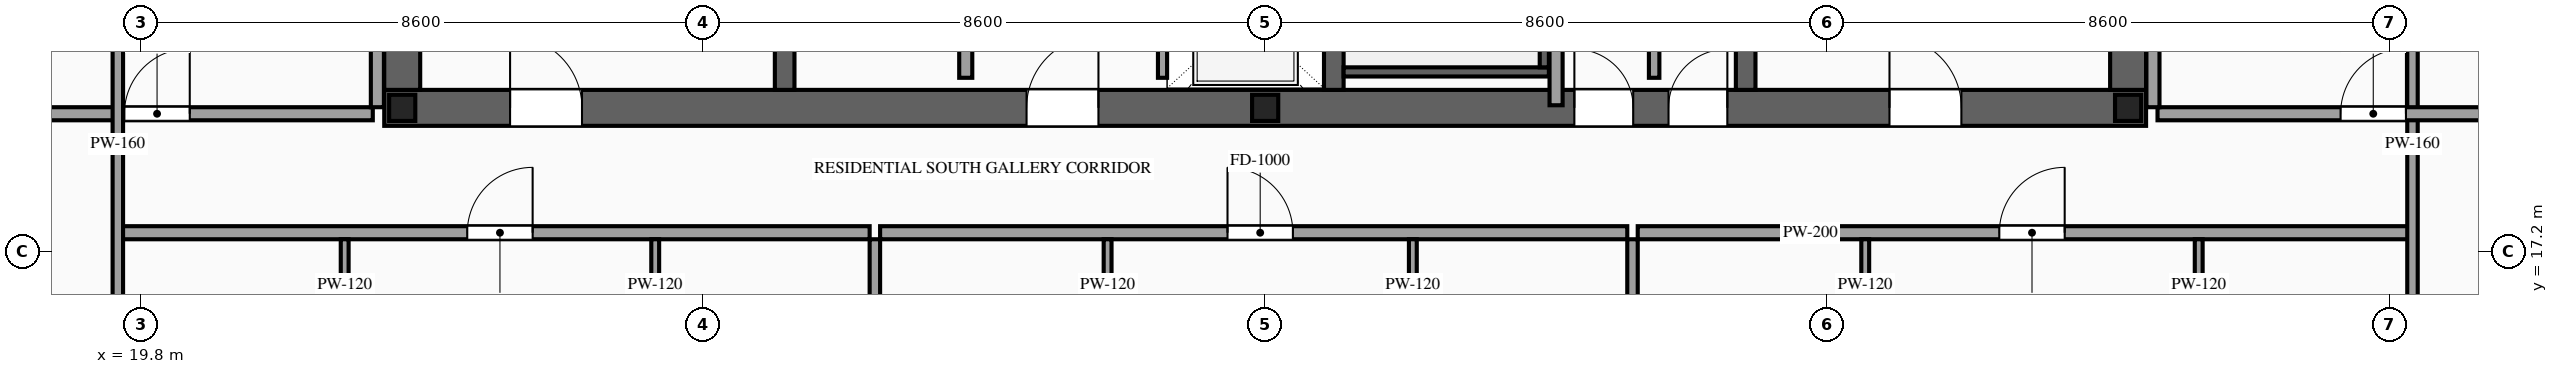
"""IFC4 building model, lengths in metres.
Left out: names, types, materials, properties, quantities, classifications, styles, units other than length and angle.
Written with IfcOpenShell. Run it as: python <this file> out.ifc"""

import sys

from ifc_helpers import new_model, si_unit, direction, frame, frame_2d, origin, origin_2d, place, context, subcontext, project, spatial, rectangle, i_section, extrude, source, transform, mapped, element, fill, save


model = new_model("IFC4")
c1 = context("Model", 3, precision=1e-05, world=origin(), true_north=direction((0.0, 1.0)))
c2 = subcontext(c1, "Body", "Model", "MODEL_VIEW")
j1 = project(units=[si_unit("LENGTHUNIT", "METRE"), si_unit("PLANEANGLEUNIT", "RADIAN")], contexts=[c1])
p1 = place(None, origin())
s1 = spatial("IfcSite", under=j1, at=p1, CompositionType="ELEMENT")
p2 = place(p1, origin())
s2 = spatial("IfcBuilding", under=s1, at=p2, CompositionType="ELEMENT")
p3 = place(p2, frame((0.0, 0.0, 238.1)))
s3 = spatial("IfcBuildingStorey", under=s2, at=p3, CompositionType="ELEMENT", Elevation=238.1)
p4 = place(p3, frame((23.525, 19.4, 0.0), z_axis=(0.0, 0.0, 1.0), x_axis=(1.0, 0.0, 0.0)))
e1 = element("IfcWall", 1, at=p4, inside=s3, PredefinedType="SHEAR", context=c2, shape_type="SweptSolid", body=[
    extrude(rectangle(XDim=26.95, YDim=0.55, at=frame_2d((13.475, 0.0))), origin(), (0.0, 0.0, 1.0), 3.5),
])
p5 = place(p4, frame((1.925, 0.0, 0.0)))
e2 = element("IfcOpeningElement", 2, at=p5, cuts=e1, PredefinedType="OPENING", context=c2, shape_type="SweptSolid", body=[
    extrude(rectangle(XDim=1.1, YDim=2.2, at=frame_2d((0.55, 1.1))), frame((0.0, 0.29, 0.0), z_axis=(0.0, -1.0, 0.0), x_axis=(1.0, 0.0, 0.0)), (0.0, 0.0, 1.0), 0.58),
])
p6 = place(p4, frame((9.825, 0.0, 0.0)))
e3 = element("IfcOpeningElement", 3, at=p6, cuts=e1, PredefinedType="OPENING", context=c2, shape_type="SweptSolid", body=[
    extrude(rectangle(XDim=1.1, YDim=2.2, at=frame_2d((0.55, 1.1))), frame((0.0, 0.29, 0.0), z_axis=(0.0, -1.0, 0.0), x_axis=(1.0, 0.0, 0.0)), (0.0, 0.0, 1.0), 0.58),
])
p7 = place(p4, frame((23.025, 0.0, 0.0)))
e4 = element("IfcOpeningElement", 4, at=p7, cuts=e1, PredefinedType="OPENING", context=c2, shape_type="SweptSolid", body=[
    extrude(rectangle(XDim=1.1, YDim=2.2, at=frame_2d((0.55, 1.1))), frame((0.0, 0.29, 0.0), z_axis=(0.0, -1.0, 0.0), x_axis=(1.0, 0.0, 0.0)), (0.0, 0.0, 1.0), 0.58),
])
p8 = place(p4, frame((19.645, 0.0, 0.0)))
e5 = element("IfcOpeningElement", 5, at=p8, cuts=e1, PredefinedType="OPENING", context=c2, shape_type="SweptSolid", body=[
    extrude(rectangle(XDim=0.9, YDim=2.15, at=frame_2d((0.45, 1.075))), frame((0.0, 0.29, 0.0), z_axis=(0.0, -1.0, 0.0), x_axis=(1.0, 0.0, 0.0)), (0.0, 0.0, 1.0), 0.58),
])
p9 = place(p4, frame((18.205, 0.0, 0.0)))
e6 = element("IfcOpeningElement", 6, at=p9, cuts=e1, PredefinedType="OPENING", context=c2, shape_type="SweptSolid", body=[
    extrude(rectangle(XDim=0.9, YDim=2.15, at=frame_2d((0.45, 1.075))), frame((0.0, 0.29, 0.0), z_axis=(0.0, -1.0, 0.0), x_axis=(1.0, 0.0, 0.0)), (0.0, 0.0, 1.0), 0.58),
])
m1 = source(origin(), c2, "Body", "SweptSolid", [
    extrude(rectangle(XDim=12.25, YDim=0.55, at=frame_2d((6.125, 0.0))), origin(), (0.0, 0.0, 1.0), 3.5),
])
for number, where, z_axis, x_axis in (
    (7, (23.8, 19.675, 0.0), (0.0, 0.0, 1.0), (0.0, 1.0, 0.0)),
    (8, (50.2, 19.675, 0.0), (0.0, 0.0, 1.0), (0.0, 1.0, 0.0)),
):
    element("IfcWall", number, at=place(p3, frame(where, z_axis=z_axis, x_axis=x_axis)), inside=s3, PredefinedType="SHEAR", context=c2, shape_type="MappedRepresentation", body=[
        mapped(m1, transform((0.0, 0.0, 0.0), scale=1.0)),
    ])
m2 = source(origin(), c2, "Body", "SweptSolid", [
    extrude(rectangle(XDim=12.25, YDim=0.3, at=frame_2d((6.125, 0.0))), origin(), (0.0, 0.0, 1.0), 3.5),
])
for number, where, z_axis, x_axis in (
    (9, (29.65, 19.675, 0.0), (0.0, 0.0, 1.0), (0.0, 1.0, 0.0)),
    (10, (38.05, 19.675, 0.0), (0.0, 0.0, 1.0), (0.0, 1.0, 0.0)),
    (11, (44.35, 19.675, 0.0), (0.0, 0.0, 1.0), (0.0, 1.0, 0.0)),
):
    element("IfcWall", number, at=place(p3, frame(where, z_axis=z_axis, x_axis=x_axis)), inside=s3, PredefinedType="SOLIDWALL", context=c2, shape_type="MappedRepresentation", body=[
        mapped(m2, transform((0.0, 0.0, 0.0), scale=1.0)),
    ])
m3 = source(origin(), c2, "Body", "SweptSolid", [
    extrude(i_section(OverallWidth=0.4, OverallDepth=0.4, WebThickness=0.013, FlangeThickness=0.021, at=origin_2d()), origin(), (0.0, 0.0, 1.0), 3.5),
])
for number, where, z_axis, x_axis in (
    (12, (23.8, 19.4, 0.0), (0.0, 0.0, 1.0), (1.0, 0.0, 0.0)),
    (13, (37.0, 19.4, 0.0), (0.0, 0.0, 1.0), (1.0, 0.0, 0.0)),
    (14, (50.2, 19.4, 0.0), (0.0, 0.0, 1.0), (1.0, 0.0, 0.0)),
):
    element("IfcColumn", number, at=place(p3, frame(where, z_axis=z_axis, x_axis=x_axis)), inside=s3, PredefinedType="COLUMN", context=c2, shape_type="MappedRepresentation", body=[
        mapped(m3, transform((0.0, 0.0, 0.0), scale=1.0)),
    ])
p10 = place(p3, frame((35.43, 19.86, 0.0), z_axis=(0.0, 0.0, 1.0), x_axis=(0.0, 1.0, 0.0)))
e15 = element("IfcWall", 15, at=p10, inside=s3, PredefinedType="SOLIDWALL", context=c2, shape_type="SweptSolid", body=[
    extrude(rectangle(XDim=2.04, YDim=0.14, at=frame_2d((1.02, 0.0))), origin(), (0.0, 0.0, 1.0), 3.28),
])
p11 = place(p10, frame((0.47, 0.0, 0.0)))
e16 = element("IfcOpeningElement", 16, at=p11, cuts=e15, PredefinedType="OPENING", context=c2, shape_type="SweptSolid", body=[
    extrude(rectangle(XDim=1.1, YDim=2.2, at=frame_2d((0.55, 1.1))), frame((0.0, 0.085, 0.0), z_axis=(0.0, -1.0, 0.0), x_axis=(1.0, 0.0, 0.0)), (0.0, 0.0, 1.0), 0.17),
])
m4 = source(origin(), c2, "Body", "SweptSolid", [
    extrude(rectangle(XDim=3.14, YDim=0.14, at=frame_2d((1.57, 0.0))), origin(), (0.0, 0.0, 1.0), 3.28),
])
p12 = place(p3, frame((38.2, 19.95, 0.0), z_axis=(0.0, 0.0, 1.0), x_axis=(1.0, 0.0, 0.0)))
e17 = element("IfcWall", 17, at=p12, inside=s3, PredefinedType="SOLIDWALL", context=c2, shape_type="MappedRepresentation", body=[
    mapped(m4, transform((0.0, 0.0, 0.0), scale=1.0)),
])
m5 = source(origin(), c2, "Body", "SweptSolid", [
    extrude(rectangle(XDim=8.94, YDim=0.14, at=frame_2d((4.47, 0.0))), origin(), (0.0, 0.0, 1.0), 3.28),
])
p13 = place(p3, frame((41.27, 20.02, 0.0), z_axis=(0.0, 0.0, 1.0), x_axis=(0.0, 1.0, 0.0)))
e18 = element("IfcWall", 18, at=p13, inside=s3, PredefinedType="SOLIDWALL", context=c2, shape_type="MappedRepresentation", body=[
    mapped(m5, transform((0.0, 0.0, 0.0), scale=1.0)),
])
p14 = place(p3, frame((32.42, 19.86, 0.0), z_axis=(0.0, 0.0, 1.0), x_axis=(0.0, 1.0, 0.0)))
e19 = element("IfcWall", 19, at=p14, inside=s3, PredefinedType="PARTITIONING", context=c2, shape_type="SweptSolid", body=[
    extrude(rectangle(XDim=7.94, YDim=0.2, at=frame_2d((3.97, 0.0))), origin(), (0.0, 0.0, 1.0), 3.28),
])
p15 = place(p14, frame((3.52, 0.0, 0.0)))
e20 = element("IfcOpeningElement", 20, at=p15, cuts=e19, PredefinedType="OPENING", context=c2, shape_type="SweptSolid", body=[
    extrude(rectangle(XDim=0.9, YDim=2.15, at=frame_2d((0.45, 1.075))), frame((0.0, 0.115, 0.0), z_axis=(0.0, -1.0, 0.0), x_axis=(1.0, 0.0, 0.0)), (0.0, 0.0, 1.0), 0.23),
])
m6 = source(origin(), c2, "Body", "SweptSolid", [
    extrude(rectangle(XDim=1.34, YDim=0.16, at=frame_2d((0.67, 0.0))), origin(), (0.0, 0.0, 1.0), 3.28),
])
p16 = place(p3, frame((42.95, 19.86, 0.0), z_axis=(0.0, 0.0, 1.0), x_axis=(0.0, 1.0, 0.0)))
e21 = element("IfcWall", 21, at=p16, inside=s3, PredefinedType="PARTITIONING", context=c2, shape_type="MappedRepresentation", body=[
    mapped(m6, transform((0.0, 0.0, 0.0), scale=1.0)),
])
m7 = source(origin(), c2, "Body", "SweptSolid", [
    extrude(rectangle(XDim=6.51, YDim=0.2, at=frame_2d((3.255, 0.0))), origin(), (0.0, 0.0, 1.0), 3.28),
])
p17 = place(p3, frame((41.45, 19.44, 0.0), z_axis=(0.0, 0.0, 1.0), x_axis=(0.0, 1.0, 0.0)))
e22 = element("IfcWall", 22, at=p17, inside=s3, PredefinedType="PARTITIONING", context=c2, shape_type="MappedRepresentation", body=[
    mapped(m7, transform((0.0, 0.0, 0.0), scale=1.0)),
])
p18 = place(p3, frame((19.44, 17.49, 0.0), z_axis=(0.0, 0.0, 1.0), x_axis=(1.0, 0.0, 0.0)))
e23 = element("IfcWall", 23, at=p18, inside=s3, PredefinedType="PARTITIONING", context=c2, shape_type="SweptSolid", body=[
    extrude(rectangle(XDim=11.51, YDim=0.2, at=frame_2d((5.755, 0.0))), origin(), (0.0, 0.0, 1.0), 3.28),
])
p19 = place(p18, frame((5.355, 0.0, 0.0)))
e24 = element("IfcOpeningElement", 24, at=p19, cuts=e23, PredefinedType="OPENING", context=c2, shape_type="SweptSolid", body=[
    extrude(rectangle(XDim=1.0, YDim=2.2, at=frame_2d((0.5, 1.1))), frame((0.0, 0.115, 0.0), z_axis=(0.0, -1.0, 0.0), x_axis=(1.0, 0.0, 0.0)), (0.0, 0.0, 1.0), 0.23),
])
m8 = source(origin(), c2, "Body", "SweptSolid", [
    extrude(rectangle(XDim=12.04, YDim=0.16, at=frame_2d((6.02, 0.0))), origin(), (0.0, 0.0, 1.0), 3.28),
])
p20 = place(p3, frame((31.03, 5.35, 0.0), z_axis=(0.0, 0.0, 1.0), x_axis=(0.0, 1.0, 0.0)))
e25 = element("IfcWall", 25, at=p20, inside=s3, PredefinedType="PARTITIONING", context=c2, shape_type="MappedRepresentation", body=[
    mapped(m8, transform((0.0, 0.0, 0.0), scale=1.0)),
])
p21 = place(p3, frame((22.92, 13.28, 0.0), z_axis=(0.0, 0.0, 1.0), x_axis=(0.0, 1.0, 0.0)))
e26 = element("IfcWall", 26, at=p21, inside=s3, PredefinedType="PARTITIONING", context=c2, shape_type="SweptSolid", body=[
    extrude(rectangle(XDim=4.11, YDim=0.12, at=frame_2d((2.055, 0.0))), origin(), (0.0, 0.0, 1.0), 3.28),
])
p22 = place(p21, frame((1.63, 0.0, 0.0)))
e27 = element("IfcOpeningElement", 27, at=p22, cuts=e26, PredefinedType="OPENING", context=c2, shape_type="SweptSolid", body=[
    extrude(rectangle(XDim=0.85, YDim=2.1, at=frame_2d((0.425, 1.05))), frame((0.0, 0.075, 0.0), z_axis=(0.0, -1.0, 0.0), x_axis=(1.0, 0.0, 0.0)), (0.0, 0.0, 1.0), 0.15),
])
p23 = place(p3, frame((27.67, 13.28, 0.0), z_axis=(0.0, 0.0, 1.0), x_axis=(0.0, 1.0, 0.0)))
e28 = element("IfcWall", 28, at=p23, inside=s3, PredefinedType="PARTITIONING", context=c2, shape_type="SweptSolid", body=[
    extrude(rectangle(XDim=4.11, YDim=0.12, at=frame_2d((2.055, 0.0))), origin(), (0.0, 0.0, 1.0), 3.28),
])
p24 = place(p23, frame((1.63, 0.0, 0.0)))
e29 = element("IfcOpeningElement", 29, at=p24, cuts=e28, PredefinedType="OPENING", context=c2, shape_type="SweptSolid", body=[
    extrude(rectangle(XDim=0.85, YDim=2.1, at=frame_2d((0.425, 1.05))), frame((0.0, 0.075, 0.0), z_axis=(0.0, -1.0, 0.0), x_axis=(1.0, 0.0, 0.0)), (0.0, 0.0, 1.0), 0.15),
])
p25 = place(p3, frame((31.11, 17.49, 0.0), z_axis=(0.0, 0.0, 1.0), x_axis=(1.0, 0.0, 0.0)))
e30 = element("IfcWall", 30, at=p25, inside=s3, PredefinedType="PARTITIONING", context=c2, shape_type="SweptSolid", body=[
    extrude(rectangle(XDim=11.429, YDim=0.2, at=frame_2d((5.714, 0.0))), origin(), (0.0, 0.0, 1.0), 3.28),
])
p26 = place(p25, frame((5.314, 0.0, 0.0)))
e31 = element("IfcOpeningElement", 31, at=p26, cuts=e30, PredefinedType="OPENING", context=c2, shape_type="SweptSolid", body=[
    extrude(rectangle(XDim=1.0, YDim=2.2, at=frame_2d((0.5, 1.1))), frame((0.0, 0.115, 0.0), z_axis=(0.0, -1.0, 0.0), x_axis=(1.0, 0.0, 0.0)), (0.0, 0.0, 1.0), 0.23),
])
p27 = place(p3, frame((42.619, 5.35, 0.0), z_axis=(0.0, 0.0, 1.0), x_axis=(0.0, 1.0, 0.0)))
e32 = element("IfcWall", 32, at=p27, inside=s3, PredefinedType="PARTITIONING", context=c2, shape_type="MappedRepresentation", body=[
    mapped(m8, transform((0.0, 0.0, 0.0), scale=1.0)),
])
p28 = place(p3, frame((34.59, 13.28, 0.0), z_axis=(0.0, 0.0, 1.0), x_axis=(0.0, 1.0, 0.0)))
e33 = element("IfcWall", 33, at=p28, inside=s3, PredefinedType="PARTITIONING", context=c2, shape_type="SweptSolid", body=[
    extrude(rectangle(XDim=4.11, YDim=0.12, at=frame_2d((2.055, 0.0))), origin(), (0.0, 0.0, 1.0), 3.28),
])
p29 = place(p28, frame((1.63, 0.0, 0.0)))
e34 = element("IfcOpeningElement", 34, at=p29, cuts=e33, PredefinedType="OPENING", context=c2, shape_type="SweptSolid", body=[
    extrude(rectangle(XDim=0.85, YDim=2.1, at=frame_2d((0.425, 1.05))), frame((0.0, 0.075, 0.0), z_axis=(0.0, -1.0, 0.0), x_axis=(1.0, 0.0, 0.0)), (0.0, 0.0, 1.0), 0.15),
])
p30 = place(p3, frame((39.259, 13.28, 0.0), z_axis=(0.0, 0.0, 1.0), x_axis=(0.0, 1.0, 0.0)))
e35 = element("IfcWall", 35, at=p30, inside=s3, PredefinedType="PARTITIONING", context=c2, shape_type="SweptSolid", body=[
    extrude(rectangle(XDim=4.11, YDim=0.12, at=frame_2d((2.055, 0.0))), origin(), (0.0, 0.0, 1.0), 3.28),
])
p31 = place(p30, frame((1.63, 0.0, 0.0)))
e36 = element("IfcOpeningElement", 36, at=p31, cuts=e35, PredefinedType="OPENING", context=c2, shape_type="SweptSolid", body=[
    extrude(rectangle(XDim=0.85, YDim=2.1, at=frame_2d((0.425, 1.05))), frame((0.0, 0.075, 0.0), z_axis=(0.0, -1.0, 0.0), x_axis=(1.0, 0.0, 0.0)), (0.0, 0.0, 1.0), 0.15),
])
p32 = place(p3, frame((42.699, 17.49, 0.0), z_axis=(0.0, 0.0, 1.0), x_axis=(1.0, 0.0, 0.0)))
e37 = element("IfcWall", 37, at=p32, inside=s3, PredefinedType="PARTITIONING", context=c2, shape_type="SweptSolid", body=[
    extrude(rectangle(XDim=11.861, YDim=0.2, at=frame_2d((5.931, 0.0))), origin(), (0.0, 0.0, 1.0), 3.28),
])
p33 = place(p32, frame((5.531, 0.0, 0.0)))
e38 = element("IfcOpeningElement", 38, at=p33, cuts=e37, PredefinedType="OPENING", context=c2, shape_type="SweptSolid", body=[
    extrude(rectangle(XDim=1.0, YDim=2.2, at=frame_2d((0.5, 1.1))), frame((0.0, 0.115, 0.0), z_axis=(0.0, -1.0, 0.0), x_axis=(1.0, 0.0, 0.0)), (0.0, 0.0, 1.0), 0.23),
])
p34 = place(p3, frame((46.179, 13.28, 0.0), z_axis=(0.0, 0.0, 1.0), x_axis=(0.0, 1.0, 0.0)))
e39 = element("IfcWall", 39, at=p34, inside=s3, PredefinedType="PARTITIONING", context=c2, shape_type="SweptSolid", body=[
    extrude(rectangle(XDim=4.11, YDim=0.12, at=frame_2d((2.055, 0.0))), origin(), (0.0, 0.0, 1.0), 3.28),
])
p35 = place(p34, frame((1.63, 0.0, 0.0)))
e40 = element("IfcOpeningElement", 40, at=p35, cuts=e39, PredefinedType="OPENING", context=c2, shape_type="SweptSolid", body=[
    extrude(rectangle(XDim=0.85, YDim=2.1, at=frame_2d((0.425, 1.05))), frame((0.0, 0.075, 0.0), z_axis=(0.0, -1.0, 0.0), x_axis=(1.0, 0.0, 0.0)), (0.0, 0.0, 1.0), 0.15),
])
p36 = place(p3, frame((51.28, 13.28, 0.0), z_axis=(0.0, 0.0, 1.0), x_axis=(0.0, 1.0, 0.0)))
e41 = element("IfcWall", 41, at=p36, inside=s3, PredefinedType="PARTITIONING", context=c2, shape_type="SweptSolid", body=[
    extrude(rectangle(XDim=4.11, YDim=0.12, at=frame_2d((2.055, 0.0))), origin(), (0.0, 0.0, 1.0), 3.28),
])
p37 = place(p36, frame((1.63, 0.0, 0.0)))
e42 = element("IfcOpeningElement", 42, at=p37, cuts=e41, PredefinedType="OPENING", context=c2, shape_type="SweptSolid", body=[
    extrude(rectangle(XDim=0.85, YDim=2.1, at=frame_2d((0.425, 1.05))), frame((0.0, 0.075, 0.0), z_axis=(0.0, -1.0, 0.0), x_axis=(1.0, 0.0, 0.0)), (0.0, 0.0, 1.0), 0.15),
])
p38 = place(p3, frame((16.55, 19.31, 0.0), z_axis=(0.0, 0.0, 1.0), x_axis=(1.0, 0.0, 0.0)))
e43 = element("IfcWall", 43, at=p38, inside=s3, PredefinedType="PARTITIONING", context=c2, shape_type="SweptSolid", body=[
    extrude(rectangle(XDim=6.8, YDim=0.2, at=frame_2d((3.4, 0.0))), origin(), (0.0, 0.0, 1.0), 2.825),
])
p39 = place(p38, frame((3.0, 0.0, 0.0)))
e44 = element("IfcOpeningElement", 44, at=p39, cuts=e43, PredefinedType="OPENING", context=c2, shape_type="SweptSolid", body=[
    extrude(rectangle(XDim=1.0, YDim=2.2, at=frame_2d((0.5, 1.1))), frame((0.0, 0.115, 0.0), z_axis=(0.0, -1.0, 0.0), x_axis=(1.0, 0.0, 0.0)), (0.0, 0.0, 1.0), 0.23),
])
m9 = source(origin(), c2, "Body", "SweptSolid", [
    extrude(rectangle(XDim=6.29, YDim=0.2, at=frame_2d((3.145, 0.0))), origin(), (0.0, 0.0, 1.0), 3.28),
])
p40 = place(p3, frame((23.42, 19.41, 0.0), z_axis=(0.0, 0.0, 1.0), x_axis=(0.0, 1.0, 0.0)))
e45 = element("IfcWall", 45, at=p40, inside=s3, PredefinedType="PARTITIONING", context=c2, shape_type="MappedRepresentation", body=[
    mapped(m9, transform((0.0, 0.0, 0.0), scale=1.0)),
])
m10 = source(origin(), c2, "Body", "SweptSolid", [
    extrude(rectangle(XDim=26.69, YDim=0.16, at=frame_2d((13.345, 0.0))), origin(), (0.0, 0.0, 1.0), 3.28),
])
for number, where, z_axis, x_axis in (
    (46, (19.45, 5.5, 0.0), (0.0, 0.0, 1.0), (0.0, 1.0, 0.0)),
    (47, (54.55, 5.5, 0.0), (0.0, 0.0, 1.0), (0.0, 1.0, 0.0)),
):
    element("IfcWall", number, at=place(p3, frame(where, z_axis=z_axis, x_axis=x_axis)), inside=s3, PredefinedType="PARTITIONING", context=c2, shape_type="MappedRepresentation", body=[
        mapped(m10, transform((0.0, 0.0, 0.0), scale=1.0)),
    ])
p41 = place(p3, frame((50.65, 19.31, 0.0), z_axis=(0.0, 0.0, 1.0), x_axis=(1.0, 0.0, 0.0)))
e48 = element("IfcWall", 48, at=p41, inside=s3, PredefinedType="PARTITIONING", context=c2, shape_type="SweptSolid", body=[
    extrude(rectangle(XDim=6.8, YDim=0.2, at=frame_2d((3.4, 0.0))), origin(), (0.0, 0.0, 1.0), 2.825),
])
p42 = place(p41, frame((2.8, 0.0, 0.0)))
e49 = element("IfcOpeningElement", 49, at=p42, cuts=e48, PredefinedType="OPENING", context=c2, shape_type="SweptSolid", body=[
    extrude(rectangle(XDim=1.0, YDim=2.2, at=frame_2d((0.5, 1.1))), frame((0.0, 0.115, 0.0), z_axis=(0.0, -1.0, 0.0), x_axis=(1.0, 0.0, 0.0)), (0.0, 0.0, 1.0), 0.23),
])
p43 = place(p3, frame((50.58, 19.41, 0.0), z_axis=(0.0, 0.0, 1.0), x_axis=(0.0, 1.0, 0.0)))
e50 = element("IfcWall", 50, at=p43, inside=s3, PredefinedType="PARTITIONING", context=c2, shape_type="MappedRepresentation", body=[
    mapped(m9, transform((0.0, 0.0, 0.0), scale=1.0)),
])
m11 = source(origin(), c2, "Body", "SweptSolid", [
    extrude(rectangle(XDim=1.1, YDim=2.2, at=frame_2d((0.55, 1.1))), frame((0.0, 0.025, 0.0), z_axis=(0.0, -1.0, 0.0), x_axis=(1.0, 0.0, 0.0)), (0.0, 0.0, 1.0), 0.05),
])
p44 = place(p5, origin())
e51 = element("IfcDoor", 51, at=p44, inside=s3, OperationType="SINGLE_SWING_LEFT", PredefinedType="DOOR", context=c2, shape_type="MappedRepresentation", body=[
    mapped(m11, transform((0.0, 0.0, 0.0), scale=1.0)),
])
fill(e2, e51)
p45 = place(p6, origin())
e52 = element("IfcDoor", 52, at=p45, inside=s3, OperationType="SINGLE_SWING_RIGHT", PredefinedType="DOOR", context=c2, shape_type="MappedRepresentation", body=[
    mapped(m11, transform((0.0, 0.0, 0.0), scale=1.0)),
])
fill(e3, e52)
p46 = place(p7, origin())
e53 = element("IfcDoor", 53, at=p46, inside=s3, OperationType="SINGLE_SWING_LEFT", PredefinedType="DOOR", context=c2, shape_type="MappedRepresentation", body=[
    mapped(m11, transform((0.0, 0.0, 0.0), scale=1.0)),
])
fill(e4, e53)
m12 = source(origin(), c2, "Body", "SweptSolid", [
    extrude(rectangle(XDim=0.9, YDim=2.15, at=frame_2d((0.45, 1.075))), frame((0.0, 0.025, 0.0), z_axis=(0.0, -1.0, 0.0), x_axis=(1.0, 0.0, 0.0)), (0.0, 0.0, 1.0), 0.05),
])
p47 = place(p8, origin())
e54 = element("IfcDoor", 54, at=p47, inside=s3, OperationType="SINGLE_SWING_RIGHT", PredefinedType="DOOR", context=c2, shape_type="MappedRepresentation", body=[
    mapped(m12, transform((0.0, 0.0, 0.0), scale=1.0)),
])
fill(e5, e54)
p48 = place(p9, origin())
e55 = element("IfcDoor", 55, at=p48, inside=s3, OperationType="SINGLE_SWING_LEFT", PredefinedType="DOOR", context=c2, shape_type="MappedRepresentation", body=[
    mapped(m12, transform((0.0, 0.0, 0.0), scale=1.0)),
])
fill(e6, e55)
m13 = source(origin(), c2, "Body", "SweptSolid", [
    extrude(rectangle(XDim=1.0, YDim=2.2, at=frame_2d((0.5, 1.1))), frame((0.0, 0.025, 0.0), z_axis=(0.0, -1.0, 0.0), x_axis=(1.0, 0.0, 0.0)), (0.0, 0.0, 1.0), 0.05),
])
p49 = place(p19, origin())
e56 = element("IfcDoor", 56, at=p49, inside=s3, OperationType="SINGLE_SWING_RIGHT", PredefinedType="DOOR", context=c2, shape_type="MappedRepresentation", body=[
    mapped(m13, transform((0.0, 0.0, 0.0), scale=1.0)),
])
fill(e24, e56)
p50 = place(p26, origin())
e57 = element("IfcDoor", 57, at=p50, inside=s3, OperationType="SINGLE_SWING_LEFT", PredefinedType="DOOR", context=c2, shape_type="MappedRepresentation", body=[
    mapped(m13, transform((0.0, 0.0, 0.0), scale=1.0)),
])
fill(e31, e57)
p51 = place(p33, origin())
e58 = element("IfcDoor", 58, at=p51, inside=s3, OperationType="SINGLE_SWING_RIGHT", PredefinedType="DOOR", context=c2, shape_type="MappedRepresentation", body=[
    mapped(m13, transform((0.0, 0.0, 0.0), scale=1.0)),
])
fill(e38, e58)
p52 = place(p39, origin())
e59 = element("IfcDoor", 59, at=p52, inside=s3, OperationType="SINGLE_SWING_RIGHT", PredefinedType="DOOR", context=c2, shape_type="MappedRepresentation", body=[
    mapped(m13, transform((0.0, 0.0, 0.0), scale=1.0)),
])
fill(e44, e59)
p53 = place(p42, origin())
e60 = element("IfcDoor", 60, at=p53, inside=s3, OperationType="SINGLE_SWING_RIGHT", PredefinedType="DOOR", context=c2, shape_type="MappedRepresentation", body=[
    mapped(m13, transform((0.0, 0.0, 0.0), scale=1.0)),
])
fill(e49, e60)
save(model, sys.argv[1])
